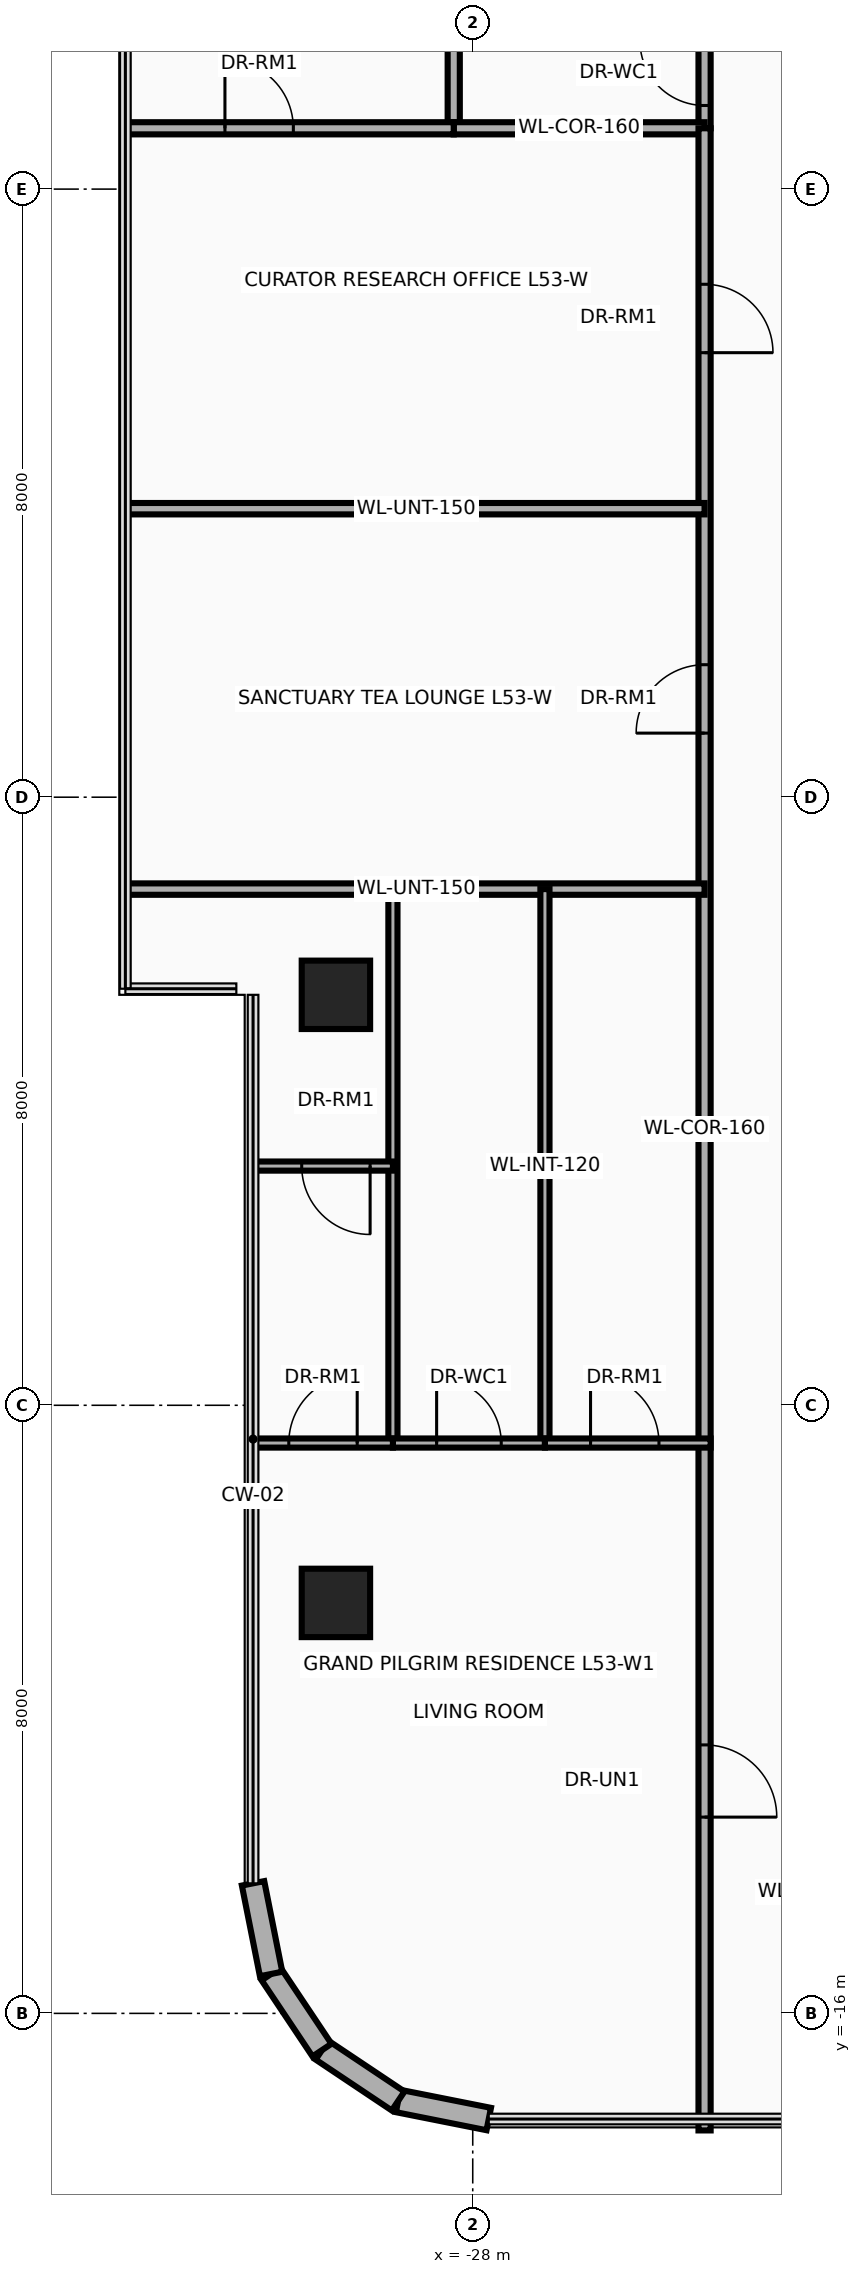
"""IFC4 building model, lengths in metres.
Left out: names, types, materials, properties, quantities, classifications, styles, units other than length and angle.
Written with IfcOpenShell. Run it as: python <this file> out.ifc"""

import sys

from ifc_helpers import new_model, si_unit, direction, frame, frame_2d, origin, origin_2d, place, context, subcontext, project, spatial, rectangle, extrude, source, transform, mapped, element, fill, save


model = new_model("IFC4")
c1 = context("Model", 3, precision=1e-05, world=origin(), true_north=direction((0.0, 1.0)))
c2 = subcontext(c1, "Body", "Model", "MODEL_VIEW")
j1 = project(units=[si_unit("LENGTHUNIT", "METRE"), si_unit("PLANEANGLEUNIT", "RADIAN")], contexts=[c1])
p1 = place(None, origin())
s1 = spatial("IfcSite", under=j1, at=p1, CompositionType="ELEMENT")
p2 = place(p1, origin())
s2 = spatial("IfcBuilding", under=s1, at=p2, CompositionType="ELEMENT")
p3 = place(p2, frame((0.0, 0.0, 209.0)))
s3 = spatial("IfcBuildingStorey", under=s2, at=p3, CompositionType="ELEMENT", Elevation=209.0)
m1 = source(origin(), c2, "Body", "SweptSolid", [
    extrude(rectangle(XDim=0.9, YDim=0.9, at=origin_2d()), origin(), (0.0, 0.0, 1.0), 3.5),
])
for number, where, z_axis, x_axis in (
    (1, (-29.8, -10.6, 0.0), (0.0, 0.0, 1.0), (1.0, 0.0, 0.0)),
    (2, (-29.8, -2.6, 0.0), (0.0, 0.0, 1.0), (1.0, 0.0, 0.0)),
):
    element("IfcColumn", number, at=place(p3, frame(where, z_axis=z_axis, x_axis=x_axis)), inside=s3, PredefinedType="COLUMN", context=c2, shape_type="MappedRepresentation", body=[
        mapped(m1, transform((0.0, 0.0, 0.0), x_axis=(1.0, 0.0, 0.0), y_axis=(0.0, 1.0, 0.0), z_axis=(0.0, 0.0, 1.0), scale=1.0)),
    ])
p4 = place(p3, frame((-27.789, -17.39, 0.0), z_axis=(0.0, 0.0, 1.0), x_axis=(-0.980804027463, 0.194996050505, 0.0)))
e3 = element("IfcWall", 3, at=p4, inside=s3, PredefinedType="SOLIDWALL", context=c2, shape_type="SweptSolid", body=[
    extrude(rectangle(XDim=1.216, YDim=0.3, at=frame_2d((0.608, 0.0))), origin(), (0.0, 0.0, 1.0), 3.26),
])
for number, where, z_axis, x_axis in (
    (4, (-28.982, -17.153, 0.0), (0.0, 0.0, 1.0), (-0.831, 0.556, 0.0)),
    (5, (-29.983, -16.483, 0.0), (0.0, 0.0, 1.0), (-0.556, 0.831, 0.0)),
):
    element("IfcWall", number, at=place(p3, frame(where, z_axis=z_axis, x_axis=x_axis)), inside=s3, PredefinedType="SOLIDWALL", context=c2, shape_type="SweptSolid", body=[
        extrude(rectangle(XDim=1.205, YDim=0.3, at=frame_2d((0.603, 0.0))), origin(), (0.0, 0.0, 1.0), 3.26),
    ])
p5 = place(p3, frame((-30.653, -15.482, 0.0), z_axis=(0.0, 0.0, 1.0), x_axis=(-0.194996050505, 0.980804027463, 0.0)))
e6 = element("IfcWall", 6, at=p5, inside=s3, PredefinedType="SOLIDWALL", context=c2, shape_type="SweptSolid", body=[
    extrude(rectangle(XDim=1.216, YDim=0.3, at=frame_2d((0.608, 0.0))), origin(), (0.0, 0.0, 1.0), 3.26),
])
p6 = place(p3, frame((-28.25, 8.8, 0.0), z_axis=(0.0, 0.0, 1.0), x_axis=(0.0, 1.0, 0.0)))
e7 = element("IfcWall", 7, at=p6, inside=s3, PredefinedType="PARTITIONING", context=c2, shape_type="SweptSolid", body=[
    extrude(rectangle(XDim=2.6, YDim=0.16, at=frame_2d((1.3, 0.0))), origin(), (0.0, 0.0, 1.0), 2.544),
])
p7 = place(p3, frame((-24.95, 8.8, 0.0), z_axis=(0.0, 0.0, 1.0), x_axis=(0.0, 1.0, 0.0)))
e8 = element("IfcWall", 8, at=p7, inside=s3, PredefinedType="PARTITIONING", context=c2, shape_type="SweptSolid", body=[
    extrude(rectangle(XDim=2.6, YDim=0.16, at=frame_2d((1.3, 0.0))), origin(), (0.0, 0.0, 1.0), 2.544),
])
p8 = place(p7, frame((0.3, 0.0, 0.0)))
e9 = element("IfcOpeningElement", 9, at=p8, cuts=e8, PredefinedType="OPENING", context=c2, shape_type="SweptSolid", body=[
    extrude(rectangle(XDim=0.85, YDim=2.1, at=frame_2d((0.425, 1.05))), frame((0.0, 0.095, 0.0), z_axis=(0.0, -1.0, 0.0), x_axis=(1.0, 0.0, 0.0)), (0.0, 0.0, 1.0), 0.19),
])
p9 = place(p7, frame((1.45, 0.0, 0.0)))
e10 = element("IfcOpeningElement", 10, at=p9, cuts=e8, PredefinedType="OPENING", context=c2, shape_type="SweptSolid", body=[
    extrude(rectangle(XDim=0.85, YDim=2.1, at=frame_2d((0.425, 1.05))), frame((0.0, 0.095, 0.0), z_axis=(0.0, -1.0, 0.0), x_axis=(1.0, 0.0, 0.0)), (0.0, 0.0, 1.0), 0.19),
])
p10 = place(p3, frame((-28.25, 8.8, 0.0), z_axis=(0.0, 0.0, 1.0), x_axis=(1.0, 0.0, 0.0)))
e11 = element("IfcWall", 11, at=p10, inside=s3, PredefinedType="PARTITIONING", context=c2, shape_type="SweptSolid", body=[
    extrude(rectangle(XDim=3.3, YDim=0.16, at=frame_2d((1.65, 0.0))), origin(), (0.0, 0.0, 1.0), 3.26),
])
p11 = place(p3, frame((-24.95, -17.54, 0.0), z_axis=(0.0, 0.0, 1.0), x_axis=(0.0, 1.0, 0.0)))
e12 = element("IfcWall", 12, at=p11, inside=s3, PredefinedType="PARTITIONING", context=c2, shape_type="SweptSolid", body=[
    extrude(rectangle(XDim=26.34, YDim=0.16, at=frame_2d((13.17, 0.0))), origin(), (0.0, 0.0, 1.0), 2.544),
])
p12 = place(p11, frame((4.122, 0.0, 0.0)))
e13 = element("IfcOpeningElement", 13, at=p12, cuts=e12, PredefinedType="OPENING", context=c2, shape_type="SweptSolid", body=[
    extrude(rectangle(XDim=0.95, YDim=2.15, at=frame_2d((0.475, 1.075))), frame((0.0, 0.095, 0.0), z_axis=(0.0, -1.0, 0.0), x_axis=(1.0, 0.0, 0.0)), (0.0, 0.0, 1.0), 0.19),
])
p13 = place(p11, frame((18.383, 0.0, 0.0)))
e14 = element("IfcOpeningElement", 14, at=p13, cuts=e12, PredefinedType="OPENING", context=c2, shape_type="SweptSolid", body=[
    extrude(rectangle(XDim=0.9, YDim=2.1, at=frame_2d((0.45, 1.05))), frame((0.0, 0.095, 0.0), z_axis=(0.0, -1.0, 0.0), x_axis=(1.0, 0.0, 0.0)), (0.0, 0.0, 1.0), 0.19),
])
p14 = place(p11, frame((23.388, 0.0, 0.0)))
e15 = element("IfcOpeningElement", 15, at=p14, cuts=e12, PredefinedType="OPENING", context=c2, shape_type="SweptSolid", body=[
    extrude(rectangle(XDim=0.9, YDim=2.1, at=frame_2d((0.45, 1.05))), frame((0.0, 0.095, 0.0), z_axis=(0.0, -1.0, 0.0), x_axis=(1.0, 0.0, 0.0)), (0.0, 0.0, 1.0), 0.19),
])
p15 = place(p3, frame((-32.54, 8.8, 0.0), z_axis=(0.0, 0.0, 1.0), x_axis=(1.0, 0.0, 0.0)))
e16 = element("IfcWall", 16, at=p15, inside=s3, PredefinedType="PARTITIONING", context=c2, shape_type="SweptSolid", body=[
    extrude(rectangle(XDim=4.29, YDim=0.16, at=frame_2d((2.145, 0.0))), origin(), (0.0, 0.0, 1.0), 2.706),
])
p16 = place(p15, frame((1.28, 0.0, 0.0)))
e17 = element("IfcOpeningElement", 17, at=p16, cuts=e16, PredefinedType="OPENING", context=c2, shape_type="SweptSolid", body=[
    extrude(rectangle(XDim=0.9, YDim=2.1, at=frame_2d((0.45, 1.05))), frame((0.0, 0.095, 0.0), z_axis=(0.0, -1.0, 0.0), x_axis=(1.0, 0.0, 0.0)), (0.0, 0.0, 1.0), 0.19),
])
p17 = place(p3, frame((-32.54, -1.209, 0.0), z_axis=(0.0, 0.0, 1.0), x_axis=(1.0, 0.0, 0.0)))
e18 = element("IfcWall", 18, at=p17, inside=s3, PredefinedType="PARTITIONING", context=c2, shape_type="SweptSolid", body=[
    extrude(rectangle(XDim=7.59, YDim=0.15, at=frame_2d((3.795, 0.0))), origin(), (0.0, 0.0, 1.0), 2.706),
])
for number, where, z_axis, x_axis in (
    (19, (-27.05, -8.497, 0.0), (0.0, 0.0, 1.0), (0.0, 1.0, 0.0)),
    (20, (-29.05, -8.497, 0.0), (0.0, 0.0, 1.0), (0.0, 1.0, 0.0)),
):
    element("IfcWall", number, at=place(p3, frame(where, z_axis=z_axis, x_axis=x_axis)), inside=s3, PredefinedType="PARTITIONING", context=c2, shape_type="SweptSolid", body=[
        extrude(rectangle(XDim=7.288, YDim=0.12, at=frame_2d((3.644, 0.0))), origin(), (0.0, 0.0, 1.0), 2.544),
    ])
p18 = place(p3, frame((-29.05, -8.497, 0.0), z_axis=(0.0, 0.0, 1.0), x_axis=(1.0, 0.0, 0.0)))
e21 = element("IfcWall", 21, at=p18, inside=s3, PredefinedType="PARTITIONING", context=c2, shape_type="SweptSolid", body=[
    extrude(rectangle(XDim=2.0, YDim=0.12, at=frame_2d((1.0, 0.0))), origin(), (0.0, 0.0, 1.0), 2.788),
])
p19 = place(p18, frame((0.575, 0.0, 0.0)))
e22 = element("IfcOpeningElement", 22, at=p19, cuts=e21, PredefinedType="OPENING", context=c2, shape_type="SweptSolid", body=[
    extrude(rectangle(XDim=0.85, YDim=2.1, at=frame_2d((0.425, 1.05))), frame((0.0, 0.075, 0.0), z_axis=(0.0, -1.0, 0.0), x_axis=(1.0, 0.0, 0.0)), (0.0, 0.0, 1.0), 0.15),
])
p20 = place(p3, frame((-27.05, -8.497, 0.0), z_axis=(0.0, 0.0, 1.0), x_axis=(1.0, 0.0, 0.0)))
e23 = element("IfcWall", 23, at=p20, inside=s3, PredefinedType="PARTITIONING", context=c2, shape_type="SweptSolid", body=[
    extrude(rectangle(XDim=2.18, YDim=0.12, at=frame_2d((1.09, 0.0))), origin(), (0.0, 0.0, 1.0), 2.788),
])
p21 = place(p20, frame((0.6, 0.0, 0.0)))
e24 = element("IfcOpeningElement", 24, at=p21, cuts=e23, PredefinedType="OPENING", context=c2, shape_type="SweptSolid", body=[
    extrude(rectangle(XDim=0.9, YDim=2.1, at=frame_2d((0.45, 1.05))), frame((0.0, 0.075, 0.0), z_axis=(0.0, -1.0, 0.0), x_axis=(1.0, 0.0, 0.0)), (0.0, 0.0, 1.0), 0.15),
])
p22 = place(p3, frame((-30.89, -8.497, 0.0), z_axis=(0.0, 0.0, 1.0), x_axis=(1.0, 0.0, 0.0)))
e25 = element("IfcWall", 25, at=p22, inside=s3, PredefinedType="PARTITIONING", context=c2, shape_type="SweptSolid", body=[
    extrude(rectangle(XDim=1.84, YDim=0.12, at=frame_2d((0.92, 0.0))), origin(), (0.0, 0.0, 1.0), 2.706),
])
p23 = place(p22, frame((0.47, 0.0, 0.0)))
e26 = element("IfcOpeningElement", 26, at=p23, cuts=e25, PredefinedType="OPENING", context=c2, shape_type="SweptSolid", body=[
    extrude(rectangle(XDim=0.9, YDim=2.1, at=frame_2d((0.45, 1.05))), frame((0.0, 0.075, 0.0), z_axis=(0.0, -1.0, 0.0), x_axis=(1.0, 0.0, 0.0)), (0.0, 0.0, 1.0), 0.15),
])
p24 = place(p3, frame((-30.89, -4.853, 0.0), z_axis=(0.0, 0.0, 1.0), x_axis=(1.0, 0.0, 0.0)))
e27 = element("IfcWall", 27, at=p24, inside=s3, PredefinedType="PARTITIONING", context=c2, shape_type="SweptSolid", body=[
    extrude(rectangle(XDim=1.84, YDim=0.12, at=frame_2d((0.92, 0.0))), origin(), (0.0, 0.0, 1.0), 2.706),
])
p25 = place(p24, frame((0.64, 0.0, 0.0)))
e28 = element("IfcOpeningElement", 28, at=p25, cuts=e27, PredefinedType="OPENING", context=c2, shape_type="SweptSolid", body=[
    extrude(rectangle(XDim=0.9, YDim=2.1, at=frame_2d((0.45, 1.05))), frame((0.0, 0.075, 0.0), z_axis=(0.0, -1.0, 0.0), x_axis=(1.0, 0.0, 0.0)), (0.0, 0.0, 1.0), 0.15),
])
p26 = place(p3, frame((-32.54, 3.795, 0.0), z_axis=(0.0, 0.0, 1.0), x_axis=(1.0, 0.0, 0.0)))
e29 = element("IfcWall", 29, at=p26, inside=s3, PredefinedType="PARTITIONING", context=c2, shape_type="SweptSolid", body=[
    extrude(rectangle(XDim=7.59, YDim=0.15, at=frame_2d((3.795, 0.0))), origin(), (0.0, 0.0, 1.0), 2.706),
])
p27 = place(p8, origin())
e30 = element("IfcDoor", 30, at=p27, inside=s3, OperationType="SINGLE_SWING_RIGHT", PredefinedType="DOOR", context=c2, shape_type="SweptSolid", body=[
    extrude(rectangle(XDim=0.85, YDim=2.1, at=frame_2d((0.425, 1.05))), frame((0.0, 0.025, 0.0), z_axis=(0.0, -1.0, 0.0), x_axis=(1.0, 0.0, 0.0)), (0.0, 0.0, 1.0), 0.05),
])
fill(e9, e30)
p28 = place(p16, origin())
e31 = element("IfcDoor", 31, at=p28, inside=s3, OperationType="SINGLE_SWING_RIGHT", PredefinedType="DOOR", context=c2, shape_type="SweptSolid", body=[
    extrude(rectangle(XDim=0.9, YDim=2.1, at=frame_2d((0.45, 1.05))), frame((0.0, 0.025, 0.0), z_axis=(0.0, -1.0, 0.0), x_axis=(1.0, 0.0, 0.0)), (0.0, 0.0, 1.0), 0.05),
])
fill(e17, e31)
p29 = place(p12, frame((0.95, 0.0, 0.0), z_axis=(0.0, 0.0, 1.0), x_axis=(-1.0, 0.0, 0.0)))
e32 = element("IfcDoor", 32, at=p29, inside=s3, OperationType="SINGLE_SWING_LEFT", PredefinedType="DOOR", context=c2, shape_type="SweptSolid", body=[
    extrude(rectangle(XDim=0.95, YDim=2.15, at=frame_2d((0.475, 1.075))), frame((0.0, 0.025, 0.0), z_axis=(0.0, -1.0, 0.0), x_axis=(1.0, 0.0, 0.0)), (0.0, 0.0, 1.0), 0.05),
])
fill(e13, e32)
p30 = place(p19, origin())
e33 = element("IfcDoor", 33, at=p30, inside=s3, OperationType="SINGLE_SWING_RIGHT", PredefinedType="DOOR", context=c2, shape_type="SweptSolid", body=[
    extrude(rectangle(XDim=0.85, YDim=2.1, at=frame_2d((0.425, 1.05))), frame((0.0, 0.025, 0.0), z_axis=(0.0, -1.0, 0.0), x_axis=(1.0, 0.0, 0.0)), (0.0, 0.0, 1.0), 0.05),
])
fill(e22, e33)
p31 = place(p21, origin())
e34 = element("IfcDoor", 34, at=p31, inside=s3, OperationType="SINGLE_SWING_LEFT", PredefinedType="DOOR", context=c2, shape_type="SweptSolid", body=[
    extrude(rectangle(XDim=0.9, YDim=2.1, at=frame_2d((0.45, 1.05))), frame((0.0, 0.025, 0.0), z_axis=(0.0, -1.0, 0.0), x_axis=(1.0, 0.0, 0.0)), (0.0, 0.0, 1.0), 0.05),
])
fill(e24, e34)
p32 = place(p23, origin())
e35 = element("IfcDoor", 35, at=p32, inside=s3, OperationType="SINGLE_SWING_RIGHT", PredefinedType="DOOR", context=c2, shape_type="SweptSolid", body=[
    extrude(rectangle(XDim=0.9, YDim=2.1, at=frame_2d((0.45, 1.05))), frame((0.0, 0.025, 0.0), z_axis=(0.0, -1.0, 0.0), x_axis=(1.0, 0.0, 0.0)), (0.0, 0.0, 1.0), 0.05),
])
fill(e26, e35)
p33 = place(p25, frame((0.9, 0.0, 0.0), z_axis=(0.0, 0.0, 1.0), x_axis=(-1.0, 0.0, 0.0)))
e36 = element("IfcDoor", 36, at=p33, inside=s3, OperationType="SINGLE_SWING_LEFT", PredefinedType="DOOR", context=c2, shape_type="SweptSolid", body=[
    extrude(rectangle(XDim=0.9, YDim=2.1, at=frame_2d((0.45, 1.05))), frame((0.0, 0.025, 0.0), z_axis=(0.0, -1.0, 0.0), x_axis=(1.0, 0.0, 0.0)), (0.0, 0.0, 1.0), 0.05),
])
fill(e28, e36)
p34 = place(p13, origin())
e37 = element("IfcDoor", 37, at=p34, inside=s3, OperationType="SINGLE_SWING_RIGHT", PredefinedType="DOOR", context=c2, shape_type="SweptSolid", body=[
    extrude(rectangle(XDim=0.9, YDim=2.1, at=frame_2d((0.45, 1.05))), frame((0.0, 0.025, 0.0), z_axis=(0.0, -1.0, 0.0), x_axis=(1.0, 0.0, 0.0)), (0.0, 0.0, 1.0), 0.05),
])
fill(e14, e37)
p35 = place(p14, frame((0.9, 0.0, 0.0), z_axis=(0.0, 0.0, 1.0), x_axis=(-1.0, 0.0, 0.0)))
e38 = element("IfcDoor", 38, at=p35, inside=s3, OperationType="SINGLE_SWING_LEFT", PredefinedType="DOOR", context=c2, shape_type="SweptSolid", body=[
    extrude(rectangle(XDim=0.9, YDim=2.1, at=frame_2d((0.45, 1.05))), frame((0.0, 0.025, 0.0), z_axis=(0.0, -1.0, 0.0), x_axis=(1.0, 0.0, 0.0)), (0.0, 0.0, 1.0), 0.05),
])
fill(e15, e38)
save(model, sys.argv[1])
